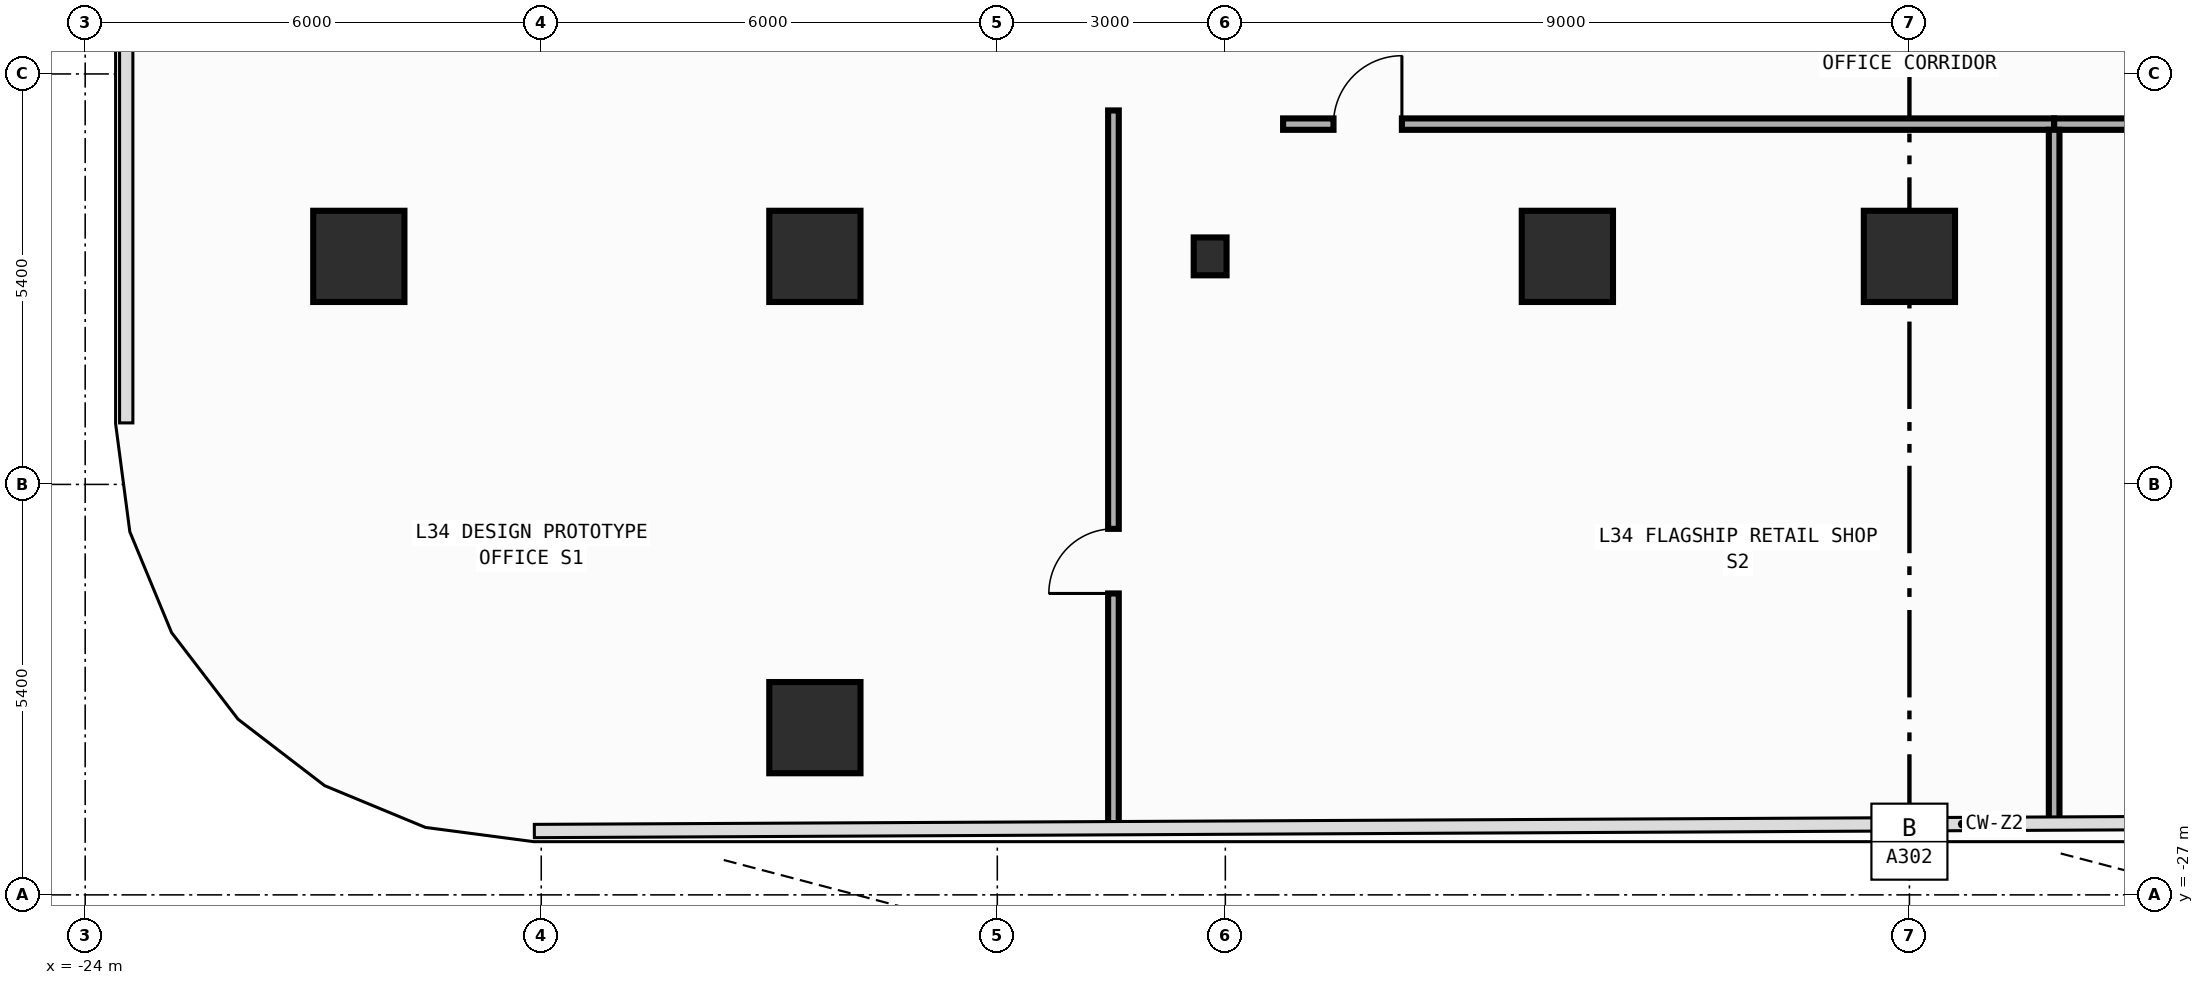
"""IFC4 building model, lengths in metres.
Left out: names, types, materials, properties, quantities, classifications, styles, units other than length and angle.
Written with IfcOpenShell. Run it as: python <this file> out.ifc"""

import sys

from ifc_helpers import new_model, si_unit, direction, frame, frame_2d, origin, origin_2d, place, context, subcontext, project, spatial, rectangle, i_section, extrude, element, fill, save


model = new_model("IFC4")
c1 = context("Model", 3, precision=1e-05, world=origin(), true_north=direction((0.0, 1.0)))
c2 = subcontext(c1, "Body", "Model", "MODEL_VIEW")
j1 = project(units=[si_unit("LENGTHUNIT", "METRE"), si_unit("PLANEANGLEUNIT", "RADIAN")], contexts=[c1])
p1 = place(None, origin())
s1 = spatial("IfcSite", under=j1, at=p1, CompositionType="ELEMENT")
p2 = place(p1, origin())
s2 = spatial("IfcBuilding", under=s1, at=p2, CompositionType="ELEMENT")
p3 = place(p2, frame((0.0, 0.0, 147.8)))
s3 = spatial("IfcBuildingStorey", under=s2, at=p3, CompositionType="ELEMENT", Elevation=147.8)
p4 = place(p3, frame((-9.2, -18.6, 0.0), z_axis=(0.0, 0.0, 1.0), x_axis=(1.0, 0.0, 0.0)))
e1 = element("IfcColumn", 1, at=p4, inside=s3, PredefinedType="COLUMN", context=c2, shape_type="SweptSolid", body=[
    extrude(i_section(OverallWidth=0.432, OverallDepth=0.498, WebThickness=0.045, FlangeThickness=0.07, FilletRadius=0.022, at=origin_2d()), origin(), (0.0, 0.0, 1.0), 4.2),
])
for number, where, z_axis, x_axis in (
    (2, (-20.4, -18.6, 0.0), (0.0, 0.0, 1.0), (1.0, 0.0, 0.0)),
    (3, (-14.4, -18.6, 0.0), (0.0, 0.0, 1.0), (1.0, 0.0, 0.0)),
    (4, (-4.5, -18.6, 0.0), (0.0, 0.0, 1.0), (1.0, 0.0, 0.0)),
    (5, (0.0, -18.6, 0.0), (0.0, 0.0, 1.0), (1.0, 0.0, 0.0)),
    (6, (-14.4, -24.8, 0.0), (0.0, 0.0, 1.0), (1.0, 0.0, 0.0)),
):
    element("IfcColumn", number, at=place(p3, frame(where, z_axis=z_axis, x_axis=x_axis)), inside=s3, PredefinedType="COLUMN", context=c2, shape_type="SweptSolid", body=[
        extrude(rectangle(XDim=1.2, YDim=1.2, at=origin_2d()), origin(), (0.0, 0.0, 1.0), 4.2),
    ])
p5 = place(p3, frame((-8.24, -16.86, 0.0), z_axis=(0.0, 0.0, 1.0), x_axis=(1.0, 0.0, 0.0)))
e7 = element("IfcWall", 7, at=p5, inside=s3, PredefinedType="PARTITIONING", context=c2, shape_type="SweptSolid", body=[
    extrude(rectangle(XDim=10.144, YDim=0.15, at=frame_2d((5.072, 0.0))), origin(), (0.0, 0.0, 1.0), 3.85),
])
p6 = place(p5, frame((0.663, 0.0, 0.0)))
e8 = element("IfcOpeningElement", 8, at=p6, cuts=e7, PredefinedType="OPENING", context=c2, shape_type="SweptSolid", body=[
    extrude(rectangle(XDim=0.9, YDim=2.15, at=frame_2d((0.45, 1.075))), frame((0.0, 0.085, 0.0), z_axis=(0.0, -1.0, 0.0), x_axis=(1.0, 0.0, 0.0)), (0.0, 0.0, 1.0), 0.17),
])
p7 = place(p3, frame((1.904, -16.86, 0.0), z_axis=(0.0, 0.0, 1.0), x_axis=(1.0, 0.0, 0.0)))
e9 = element("IfcWall", 9, at=p7, inside=s3, PredefinedType="PARTITIONING", context=c2, shape_type="SweptSolid", body=[
    extrude(rectangle(XDim=6.336, YDim=0.15, at=frame_2d((3.168, 0.0))), origin(), (0.0, 0.0, 1.0), 3.85),
])
p8 = place(p7, frame((4.771, 0.0, 0.0)))
e10 = element("IfcOpeningElement", 10, at=p8, cuts=e9, PredefinedType="OPENING", context=c2, shape_type="SweptSolid", body=[
    extrude(rectangle(XDim=0.9, YDim=2.15, at=frame_2d((0.45, 1.075))), frame((0.0, 0.085, 0.0), z_axis=(0.0, -1.0, 0.0), x_axis=(1.0, 0.0, 0.0)), (0.0, 0.0, 1.0), 0.17),
])
p9 = place(p3, frame((-10.472, -26.118, 0.0), z_axis=(0.0, 0.0, 1.0), x_axis=(0.0, 1.0, 0.0)))
e11 = element("IfcWall", 11, at=p9, inside=s3, PredefinedType="PARTITIONING", context=c2, shape_type="SweptSolid", body=[
    extrude(rectangle(XDim=9.438, YDim=0.14, at=frame_2d((4.719, 0.0))), origin(), (0.0, 0.0, 1.0), 3.85),
])
p10 = place(p9, frame((3.083, 0.0, 0.0)))
e12 = element("IfcOpeningElement", 12, at=p10, cuts=e11, PredefinedType="OPENING", context=c2, shape_type="SweptSolid", body=[
    extrude(rectangle(XDim=0.85, YDim=2.1, at=frame_2d((0.425, 1.05))), frame((0.0, 0.08, 0.0), z_axis=(0.0, -1.0, 0.0), x_axis=(1.0, 0.0, 0.0)), (0.0, 0.0, 1.0), 0.16),
])
p11 = place(p3, frame((1.904, -26.057, 0.0), z_axis=(0.0, 0.0, 1.0), x_axis=(0.0, 1.0, 0.0)))
e13 = element("IfcWall", 13, at=p11, inside=s3, PredefinedType="PARTITIONING", context=c2, shape_type="SweptSolid", body=[
    extrude(rectangle(XDim=9.122, YDim=0.14, at=frame_2d((4.561, 0.0))), origin(), (0.0, 0.0, 1.0), 3.85),
])
p12 = place(p6, origin())
e14 = element("IfcDoor", 14, at=p12, inside=s3, OperationType="SINGLE_SWING_RIGHT", PredefinedType="DOOR", context=c2, shape_type="SweptSolid", body=[
    extrude(rectangle(XDim=0.9, YDim=2.15, at=frame_2d((0.45, 1.075))), frame((0.0, 0.025, 0.0), z_axis=(0.0, -1.0, 0.0), x_axis=(1.0, 0.0, 0.0)), (0.0, 0.0, 1.0), 0.05),
])
fill(e8, e14)
p13 = place(p10, origin())
e15 = element("IfcDoor", 15, at=p13, inside=s3, OperationType="SINGLE_SWING_LEFT", PredefinedType="DOOR", context=c2, shape_type="SweptSolid", body=[
    extrude(rectangle(XDim=0.85, YDim=2.1, at=frame_2d((0.425, 1.05))), frame((0.0, 0.025, 0.0), z_axis=(0.0, -1.0, 0.0), x_axis=(1.0, 0.0, 0.0)), (0.0, 0.0, 1.0), 0.05),
])
fill(e12, e15)
save(model, sys.argv[1])
